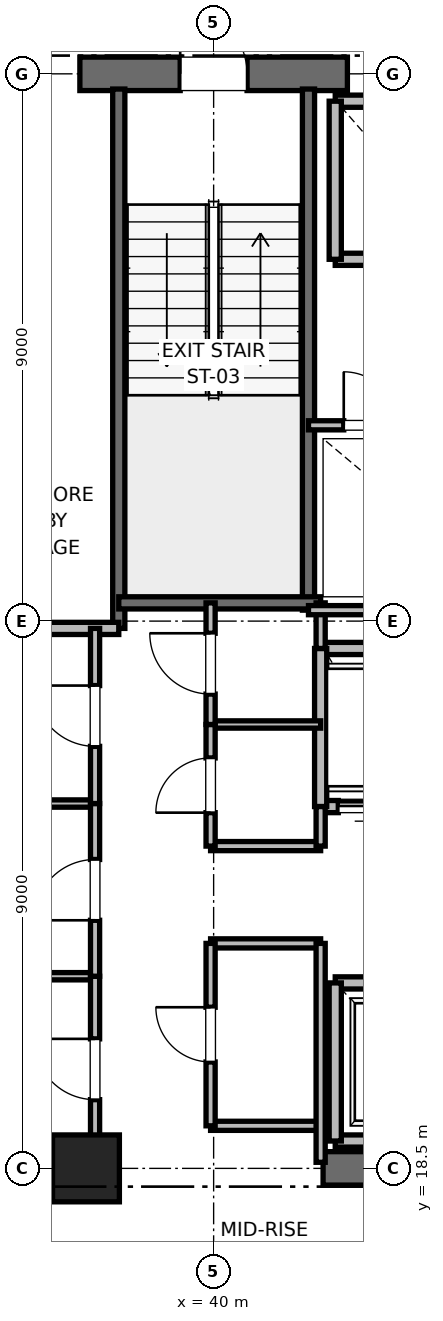
"""IFC4 building model, lengths in metres.
Left out: names, types, materials, properties, quantities, classifications, styles, units other than length and angle.
Written with IfcOpenShell. Run it as: python <this file> out.ifc"""

import sys

from ifc_helpers import new_model, si_unit, direction, frame, frame_2d, origin, origin_2d, place, context, subcontext, project, spatial, rectangle, extrude, element, fill, save


model = new_model("IFC4")
c1 = context("Model", 3, precision=1e-05, world=origin(), true_north=direction((0.0, 1.0)))
c2 = subcontext(c1, "Body", "Model", "MODEL_VIEW")
j1 = project(units=[si_unit("LENGTHUNIT", "METRE"), si_unit("PLANEANGLEUNIT", "RADIAN")], contexts=[c1])
p1 = place(None, origin())
s1 = spatial("IfcSite", under=j1, at=p1, CompositionType="ELEMENT")
p2 = place(p1, origin())
s2 = spatial("IfcBuilding", under=s1, at=p2, CompositionType="ELEMENT")
p3 = place(p2, frame((0.0, 0.0, 172.4)))
s3 = spatial("IfcBuildingStorey", under=s2, at=p3, CompositionType="ELEMENT", Elevation=172.4)
p4 = place(p3, frame((37.9, 18.5, 0.0), z_axis=(0.0, 0.0, 1.0), x_axis=(1.0, 0.0, 0.0)))
e1 = element("IfcColumn", 1, at=p4, inside=s3, PredefinedType="PILASTER", context=c2, shape_type="SweptSolid", body=[
    extrude(rectangle(XDim=1.1, YDim=1.1, at=origin_2d()), origin(), (0.0, 0.0, 1.0), 4.0),
])
for number, where, z_axis, x_axis in (
    (2, (29.0, 18.5, 0.0), (0.0, 0.0, 1.0), (1.0, 0.0, 0.0)),
    (3, (41.8, 18.5, 0.0), (0.0, 0.0, 1.0), (1.0, 0.0, 0.0)),
):
    element("IfcWall", number, at=place(p3, frame(where, z_axis=z_axis, x_axis=x_axis)), inside=s3, PredefinedType="SHEAR", context=c2, shape_type="SweptSolid", body=[
        extrude(rectangle(XDim=9.2, YDim=0.55, at=frame_2d((4.6, 0.0))), origin(), (0.0, 0.0, 1.0), 3.775),
    ])
p5 = place(p3, frame((37.8, 36.5, 0.0), z_axis=(0.0, 0.0, 1.0), x_axis=(1.0, 0.0, 0.0)))
e4 = element("IfcWall", 4, at=p5, inside=s3, PredefinedType="SHEAR", context=c2, shape_type="SweptSolid", body=[
    extrude(rectangle(XDim=4.4, YDim=0.55, at=frame_2d((2.2, 0.0))), origin(), (0.0, 0.0, 1.0), 3.775),
])
p6 = place(p5, frame((1.65, 0.0, 0.0)))
e5 = element("IfcOpeningElement", 5, at=p6, cuts=e4, PredefinedType="OPENING", context=c2, shape_type="SweptSolid", body=[
    extrude(rectangle(XDim=1.1, YDim=2.15, at=frame_2d((0.55, 1.075))), frame((0.0, 0.275, 0.0), z_axis=(0.0, -1.0, 0.0), x_axis=(1.0, 0.0, 0.0)), (0.0, 0.0, 1.0), 0.55),
])
p7 = place(p3, frame((38.44, 27.38, 0.0), z_axis=(0.0, 0.0, 1.0), x_axis=(0.0, 1.0, 0.0)))
e6 = element("IfcWall", 6, at=p7, inside=s3, PredefinedType="SOLIDWALL", context=c2, shape_type="SweptSolid", body=[
    extrude(rectangle(XDim=8.87, YDim=0.2, at=frame_2d((4.435, 0.0))), origin(), (0.0, 0.0, 1.0), 3.775),
])
p8 = place(p3, frame((41.56, 27.68, 0.0), z_axis=(0.0, 0.0, 1.0), x_axis=(0.0, 1.0, 0.0)))
e7 = element("IfcWall", 7, at=p8, inside=s3, PredefinedType="SOLIDWALL", context=c2, shape_type="SweptSolid", body=[
    extrude(rectangle(XDim=8.57, YDim=0.2, at=frame_2d((4.285, 0.0))), origin(), (0.0, 0.0, 1.0), 3.775),
])
p9 = place(p3, frame((38.44, 27.8, 0.0), z_axis=(0.0, 0.0, 1.0), x_axis=(1.0, 0.0, 0.0)))
e8 = element("IfcWall", 8, at=p9, inside=s3, PredefinedType="SOLIDWALL", context=c2, shape_type="SweptSolid", body=[
    extrude(rectangle(XDim=3.32, YDim=0.2, at=frame_2d((1.66, 0.0))), origin(), (0.0, 0.0, 1.0), 3.775),
])
p10 = place(p3, frame((32.82, 27.38, 0.0), z_axis=(0.0, 0.0, 1.0), x_axis=(1.0, 0.0, 0.0)))
e9 = element("IfcWall", 9, at=p10, inside=s3, PredefinedType="PARTITIONING", context=c2, shape_type="SweptSolid", body=[
    extrude(rectangle(XDim=5.62, YDim=0.2, at=frame_2d((2.81, 0.0))), origin(), (0.0, 0.0, 1.0), 3.775),
])
p11 = place(p3, frame((42.0, 18.95, 0.0), z_axis=(0.0, 0.0, 1.0), x_axis=(1.0, 0.0, 0.0)))
e10 = element("IfcWall", 10, at=p11, inside=s3, PredefinedType="SOLIDWALL", context=c2, shape_type="SweptSolid", body=[
    extrude(rectangle(XDim=2.3, YDim=0.2, at=frame_2d((1.15, 0.0))), origin(), (0.0, 0.0, 1.0), 2.755),
])
p12 = place(p3, frame((44.3, 21.55, 0.0), z_axis=(0.0, 0.0, 1.0), x_axis=(-1.0, 0.0, 0.0)))
e11 = element("IfcWall", 11, at=p12, inside=s3, PredefinedType="SOLIDWALL", context=c2, shape_type="SweptSolid", body=[
    extrude(rectangle(XDim=2.3, YDim=0.2, at=frame_2d((1.15, 0.0))), origin(), (0.0, 0.0, 1.0), 3.775),
])
p13 = place(p12, frame((0.6, 0.0, 0.0)))
e12 = element("IfcOpeningElement", 12, at=p13, cuts=e11, PredefinedType="OPENING", context=c2, shape_type="SweptSolid", body=[
    extrude(rectangle(XDim=1.1, YDim=2.2, at=frame_2d((0.55, 1.1))), frame((0.0, 0.1, 0.0), z_axis=(0.0, -1.0, 0.0), x_axis=(1.0, 0.0, 0.0)), (0.0, 0.0, 1.0), 0.2),
])
p14 = place(p3, frame((42.0, 21.55, 0.0), z_axis=(0.0, 0.0, 1.0), x_axis=(0.0, -1.0, 0.0)))
e13 = element("IfcWall", 13, at=p14, inside=s3, PredefinedType="SOLIDWALL", context=c2, shape_type="SweptSolid", body=[
    extrude(rectangle(XDim=2.6, YDim=0.2, at=frame_2d((1.3, 0.0))), origin(), (0.0, 0.0, 1.0), 2.755),
])
p15 = place(p3, frame((41.76, 24.45, 0.0), z_axis=(0.0, 0.0, 1.0), x_axis=(1.0, 0.0, 0.0)))
e14 = element("IfcWall", 14, at=p15, inside=s3, PredefinedType="SOLIDWALL", context=c2, shape_type="SweptSolid", body=[
    extrude(rectangle(XDim=1.68, YDim=0.2, at=frame_2d((0.84, 0.0))), origin(), (0.0, 0.0, 1.0), 3.775),
])
p16 = place(p15, frame((0.29, 0.0, 0.0)))
e15 = element("IfcOpeningElement", 15, at=p16, cuts=e14, PredefinedType="OPENING", context=c2, shape_type="SweptSolid", body=[
    extrude(rectangle(XDim=1.1, YDim=2.2, at=frame_2d((0.55, 1.1))), frame((0.0, 0.1, 0.0), z_axis=(0.0, -1.0, 0.0), x_axis=(1.0, 0.0, 0.0)), (0.0, 0.0, 1.0), 0.2),
])
p17 = place(p3, frame((43.44, 27.05, 0.0), z_axis=(0.0, 0.0, 1.0), x_axis=(-1.0, 0.0, 0.0)))
e16 = element("IfcWall", 16, at=p17, inside=s3, PredefinedType="SOLIDWALL", context=c2, shape_type="SweptSolid", body=[
    extrude(rectangle(XDim=1.68, YDim=0.2, at=frame_2d((0.84, 0.0))), origin(), (0.0, 0.0, 1.0), 3.775),
])
p18 = place(p3, frame((41.76, 27.05, 0.0), z_axis=(0.0, 0.0, 1.0), x_axis=(0.0, -1.0, 0.0)))
e17 = element("IfcWall", 17, at=p18, inside=s3, PredefinedType="SOLIDWALL", context=c2, shape_type="SweptSolid", body=[
    extrude(rectangle(XDim=2.6, YDim=0.2, at=frame_2d((1.3, 0.0))), origin(), (0.0, 0.0, 1.0), 3.775),
])
p19 = place(p3, frame((42.0, 33.45, 0.0), z_axis=(0.0, 0.0, 1.0), x_axis=(1.0, 0.0, 0.0)))
e18 = element("IfcWall", 18, at=p19, inside=s3, PredefinedType="SOLIDWALL", context=c2, shape_type="SweptSolid", body=[
    extrude(rectangle(XDim=2.3, YDim=0.2, at=frame_2d((1.15, 0.0))), origin(), (0.0, 0.0, 1.0), 3.775),
])
p20 = place(p3, frame((44.3, 36.05, 0.0), z_axis=(0.0, 0.0, 1.0), x_axis=(-1.0, 0.0, 0.0)))
e19 = element("IfcWall", 19, at=p20, inside=s3, PredefinedType="SOLIDWALL", context=c2, shape_type="SweptSolid", body=[
    extrude(rectangle(XDim=2.3, YDim=0.2, at=frame_2d((1.15, 0.0))), origin(), (0.0, 0.0, 1.0), 2.755),
])
p21 = place(p3, frame((42.0, 36.05, 0.0), z_axis=(0.0, 0.0, 1.0), x_axis=(0.0, -1.0, 0.0)))
e20 = element("IfcWall", 20, at=p21, inside=s3, PredefinedType="SOLIDWALL", context=c2, shape_type="SweptSolid", body=[
    extrude(rectangle(XDim=2.6, YDim=0.2, at=frame_2d((1.3, 0.0))), origin(), (0.0, 0.0, 1.0), 2.755),
])
for number, where, z_axis, x_axis in (
    (21, (39.95, 19.2, 0.0), (0.0, 0.0, 1.0), (1.0, 0.0, 0.0)),
    (22, (39.95, 22.2, 0.0), (0.0, 0.0, 1.0), (1.0, 0.0, 0.0)),
    (23, (39.95, 23.8, 0.0), (0.0, 0.0, 1.0), (1.0, 0.0, 0.0)),
):
    element("IfcWall", number, at=place(p3, frame(where, z_axis=z_axis, x_axis=x_axis)), inside=s3, PredefinedType="PARTITIONING", context=c2, shape_type="SweptSolid", body=[
        extrude(rectangle(XDim=1.81, YDim=0.15, at=frame_2d((0.905, 0.0))), origin(), (0.0, 0.0, 1.0), 2.85),
    ])
p22 = place(p3, frame((39.95, 25.8, 0.0), z_axis=(0.0, 0.0, 1.0), x_axis=(1.0, 0.0, 0.0)))
e24 = element("IfcWall", 24, at=p22, inside=s3, PredefinedType="PARTITIONING", context=c2, shape_type="SweptSolid", body=[
    extrude(rectangle(XDim=1.81, YDim=0.12, at=frame_2d((0.905, 0.0))), origin(), (0.0, 0.0, 1.0), 2.85),
])
p23 = place(p3, frame((41.76, 18.6, 0.0), z_axis=(0.0, 0.0, 1.0), x_axis=(0.0, 1.0, 0.0)))
e25 = element("IfcWall", 25, at=p23, inside=s3, PredefinedType="PARTITIONING", context=c2, shape_type="SweptSolid", body=[
    extrude(rectangle(XDim=3.6, YDim=0.15, at=frame_2d((1.8, 0.0))), origin(), (0.0, 0.0, 1.0), 2.755),
])
p24 = place(p3, frame((41.76, 23.8, 0.0), z_axis=(0.0, 0.0, 1.0), x_axis=(0.0, 1.0, 0.0)))
e26 = element("IfcWall", 26, at=p24, inside=s3, PredefinedType="PARTITIONING", context=c2, shape_type="SweptSolid", body=[
    extrude(rectangle(XDim=0.65, YDim=0.15, at=frame_2d((0.325, 0.0))), origin(), (0.0, 0.0, 1.0), 2.85),
])
p25 = place(p3, frame((41.76, 27.05, 0.0), z_axis=(0.0, 0.0, 1.0), x_axis=(0.0, 1.0, 0.0)))
e27 = element("IfcWall", 27, at=p25, inside=s3, PredefinedType="PARTITIONING", context=c2, shape_type="SweptSolid", body=[
    extrude(rectangle(XDim=0.75, YDim=0.15, at=frame_2d((0.375, 0.0))), origin(), (0.0, 0.0, 1.0), 2.85),
])
p26 = place(p3, frame((39.95, 19.2, 0.0), z_axis=(0.0, 0.0, 1.0), x_axis=(0.0, 1.0, 0.0)))
e28 = element("IfcWall", 28, at=p26, inside=s3, PredefinedType="PARTITIONING", context=c2, shape_type="SweptSolid", body=[
    extrude(rectangle(XDim=3.0, YDim=0.15, at=frame_2d((1.5, 0.0))), origin(), (0.0, 0.0, 1.0), 2.85),
])
p27 = place(p26, frame((1.05, 0.0, 0.0)))
e29 = element("IfcOpeningElement", 29, at=p27, cuts=e28, PredefinedType="OPENING", context=c2, shape_type="SweptSolid", body=[
    extrude(rectangle(XDim=0.9, YDim=2.1, at=frame_2d((0.45, 1.05))), frame((0.0, 0.075, 0.0), z_axis=(0.0, -1.0, 0.0), x_axis=(1.0, 0.0, 0.0)), (0.0, 0.0, 1.0), 0.15),
])
p28 = place(p3, frame((39.95, 23.8, 0.0), z_axis=(0.0, 0.0, 1.0), x_axis=(0.0, 1.0, 0.0)))
e30 = element("IfcWall", 30, at=p28, inside=s3, PredefinedType="PARTITIONING", context=c2, shape_type="SweptSolid", body=[
    extrude(rectangle(XDim=2.0, YDim=0.15, at=frame_2d((1.0, 0.0))), origin(), (0.0, 0.0, 1.0), 2.85),
])
p29 = place(p28, frame((0.55, 0.0, 0.0)))
e31 = element("IfcOpeningElement", 31, at=p29, cuts=e30, PredefinedType="OPENING", context=c2, shape_type="SweptSolid", body=[
    extrude(rectangle(XDim=0.9, YDim=2.1, at=frame_2d((0.45, 1.05))), frame((0.0, 0.075, 0.0), z_axis=(0.0, -1.0, 0.0), x_axis=(1.0, 0.0, 0.0)), (0.0, 0.0, 1.0), 0.15),
])
p30 = place(p3, frame((39.95, 25.8, 0.0), z_axis=(0.0, 0.0, 1.0), x_axis=(0.0, 1.0, 0.0)))
e32 = element("IfcWall", 32, at=p30, inside=s3, PredefinedType="PARTITIONING", context=c2, shape_type="SweptSolid", body=[
    extrude(rectangle(XDim=2.0, YDim=0.15, at=frame_2d((1.0, 0.0))), origin(), (0.0, 0.0, 1.0), 2.85),
])
p31 = place(p30, frame((0.5, 0.0, 0.0)))
e33 = element("IfcOpeningElement", 33, at=p31, cuts=e32, PredefinedType="OPENING", context=c2, shape_type="SweptSolid", body=[
    extrude(rectangle(XDim=1.0, YDim=2.15, at=frame_2d((0.5, 1.075))), frame((0.0, 0.075, 0.0), z_axis=(0.0, -1.0, 0.0), x_axis=(1.0, 0.0, 0.0)), (0.0, 0.0, 1.0), 0.15),
])
for number, where, z_axis, x_axis in (
    (34, (32.82, 21.66, 0.0), (0.0, 0.0, 1.0), (1.0, 0.0, 0.0)),
    (35, (32.82, 24.5, 0.0), (0.0, 0.0, 1.0), (1.0, 0.0, 0.0)),
):
    element("IfcWall", number, at=place(p3, frame(where, z_axis=z_axis, x_axis=x_axis)), inside=s3, PredefinedType="PARTITIONING", context=c2, shape_type="SweptSolid", body=[
        extrude(rectangle(XDim=5.23, YDim=0.12, at=frame_2d((2.615, 0.0))), origin(), (0.0, 0.0, 1.0), 2.85),
    ])
p32 = place(p3, frame((38.05, 18.6, 0.0), z_axis=(0.0, 0.0, 1.0), x_axis=(0.0, 1.0, 0.0)))
e36 = element("IfcWall", 36, at=p32, inside=s3, PredefinedType="PARTITIONING", context=c2, shape_type="SweptSolid", body=[
    extrude(rectangle(XDim=3.06, YDim=0.15, at=frame_2d((1.53, 0.0))), origin(), (0.0, 0.0, 1.0), 2.755),
])
p33 = place(p32, frame((1.03, 0.0, 0.0)))
e37 = element("IfcOpeningElement", 37, at=p33, cuts=e36, PredefinedType="OPENING", context=c2, shape_type="SweptSolid", body=[
    extrude(rectangle(XDim=1.0, YDim=2.15, at=frame_2d((0.5, 1.075))), frame((0.0, 0.075, 0.0), z_axis=(0.0, -1.0, 0.0), x_axis=(1.0, 0.0, 0.0)), (0.0, 0.0, 1.0), 0.15),
])
p34 = place(p3, frame((38.05, 21.66, 0.0), z_axis=(0.0, 0.0, 1.0), x_axis=(0.0, 1.0, 0.0)))
e38 = element("IfcWall", 38, at=p34, inside=s3, PredefinedType="PARTITIONING", context=c2, shape_type="SweptSolid", body=[
    extrude(rectangle(XDim=2.84, YDim=0.15, at=frame_2d((1.42, 0.0))), origin(), (0.0, 0.0, 1.0), 2.85),
])
p35 = place(p34, frame((0.92, 0.0, 0.0)))
e39 = element("IfcOpeningElement", 39, at=p35, cuts=e38, PredefinedType="OPENING", context=c2, shape_type="SweptSolid", body=[
    extrude(rectangle(XDim=1.0, YDim=2.15, at=frame_2d((0.5, 1.075))), frame((0.0, 0.075, 0.0), z_axis=(0.0, -1.0, 0.0), x_axis=(1.0, 0.0, 0.0)), (0.0, 0.0, 1.0), 0.15),
])
p36 = place(p3, frame((38.05, 24.5, 0.0), z_axis=(0.0, 0.0, 1.0), x_axis=(0.0, 1.0, 0.0)))
e40 = element("IfcWall", 40, at=p36, inside=s3, PredefinedType="PARTITIONING", context=c2, shape_type="SweptSolid", body=[
    extrude(rectangle(XDim=2.88, YDim=0.15, at=frame_2d((1.44, 0.0))), origin(), (0.0, 0.0, 1.0), 2.85),
])
p37 = place(p36, frame((0.94, 0.0, 0.0)))
e41 = element("IfcOpeningElement", 41, at=p37, cuts=e40, PredefinedType="OPENING", context=c2, shape_type="SweptSolid", body=[
    extrude(rectangle(XDim=1.0, YDim=2.15, at=frame_2d((0.5, 1.075))), frame((0.0, 0.075, 0.0), z_axis=(0.0, -1.0, 0.0), x_axis=(1.0, 0.0, 0.0)), (0.0, 0.0, 1.0), 0.15),
])
p38 = place(p3, frame((41.56, 27.68, 0.0), z_axis=(0.0, 0.0, 1.0), x_axis=(1.0, 0.0, 0.0)))
e42 = element("IfcWall", 42, at=p38, inside=s3, PredefinedType="PARTITIONING", context=c2, shape_type="SweptSolid", body=[
    extrude(rectangle(XDim=3.59, YDim=0.15, at=frame_2d((1.795, 0.0))), origin(), (0.0, 0.0, 1.0), 2.85),
])
p39 = place(p3, frame((41.56, 30.72, 0.0), z_axis=(0.0, 0.0, 1.0), x_axis=(1.0, 0.0, 0.0)))
e43 = element("IfcWall", 43, at=p39, inside=s3, PredefinedType="PARTITIONING", context=c2, shape_type="SweptSolid", body=[
    extrude(rectangle(XDim=2.04, YDim=0.15, at=frame_2d((1.02, 0.0))), origin(), (0.0, 0.0, 1.0), 2.85),
])
p40 = place(p39, frame((0.58, 0.0, 0.0)))
e44 = element("IfcOpeningElement", 44, at=p40, cuts=e43, PredefinedType="OPENING", context=c2, shape_type="SweptSolid", body=[
    extrude(rectangle(XDim=0.88, YDim=2.1, at=frame_2d((0.44, 1.05))), frame((0.0, 0.075, 0.0), z_axis=(0.0, -1.0, 0.0), x_axis=(1.0, 0.0, 0.0)), (0.0, 0.0, 1.0), 0.15),
])
p41 = place(p6, origin())
e45 = element("IfcDoor", 45, at=p41, inside=s3, OperationType="SINGLE_SWING_LEFT", PredefinedType="DOOR", context=c2, shape_type="SweptSolid", body=[
    extrude(rectangle(XDim=1.1, YDim=2.15, at=frame_2d((0.55, 1.075))), frame((0.0, 0.025, 0.0), z_axis=(0.0, -1.0, 0.0), x_axis=(1.0, 0.0, 0.0)), (0.0, 0.0, 1.0), 0.05),
])
fill(e5, e45)
p42 = place(p16, origin())
e46 = element("IfcDoor", 46, at=p42, inside=s3, OperationType="SLIDING_TO_RIGHT", PredefinedType="DOOR", context=c2, shape_type="SweptSolid", body=[
    extrude(rectangle(XDim=1.1, YDim=2.2, at=frame_2d((0.55, 1.1))), frame((0.0, 0.025, 0.0), z_axis=(0.0, -1.0, 0.0), x_axis=(1.0, 0.0, 0.0)), (0.0, 0.0, 1.0), 0.05),
])
fill(e15, e46)
p43 = place(p27, origin())
e47 = element("IfcDoor", 47, at=p43, inside=s3, OperationType="SINGLE_SWING_RIGHT", PredefinedType="DOOR", context=c2, shape_type="SweptSolid", body=[
    extrude(rectangle(XDim=0.9, YDim=2.1, at=frame_2d((0.45, 1.05))), frame((0.0, 0.025, 0.0), z_axis=(0.0, -1.0, 0.0), x_axis=(1.0, 0.0, 0.0)), (0.0, 0.0, 1.0), 0.05),
])
fill(e29, e47)
p44 = place(p29, origin())
e48 = element("IfcDoor", 48, at=p44, inside=s3, OperationType="SINGLE_SWING_LEFT", PredefinedType="DOOR", context=c2, shape_type="SweptSolid", body=[
    extrude(rectangle(XDim=0.9, YDim=2.1, at=frame_2d((0.45, 1.05))), frame((0.0, 0.025, 0.0), z_axis=(0.0, -1.0, 0.0), x_axis=(1.0, 0.0, 0.0)), (0.0, 0.0, 1.0), 0.05),
])
fill(e31, e48)
p45 = place(p31, origin())
e49 = element("IfcDoor", 49, at=p45, inside=s3, OperationType="SINGLE_SWING_RIGHT", PredefinedType="DOOR", context=c2, shape_type="SweptSolid", body=[
    extrude(rectangle(XDim=1.0, YDim=2.15, at=frame_2d((0.5, 1.075))), frame((0.0, 0.025, 0.0), z_axis=(0.0, -1.0, 0.0), x_axis=(1.0, 0.0, 0.0)), (0.0, 0.0, 1.0), 0.05),
])
fill(e33, e49)
p46 = place(p33, origin())
e50 = element("IfcDoor", 50, at=p46, inside=s3, OperationType="SINGLE_SWING_RIGHT", PredefinedType="DOOR", context=c2, shape_type="SweptSolid", body=[
    extrude(rectangle(XDim=1.0, YDim=2.15, at=frame_2d((0.5, 1.075))), frame((0.0, 0.025, 0.0), z_axis=(0.0, -1.0, 0.0), x_axis=(1.0, 0.0, 0.0)), (0.0, 0.0, 1.0), 0.05),
])
fill(e37, e50)
p47 = place(p35, origin())
e51 = element("IfcDoor", 51, at=p47, inside=s3, OperationType="SINGLE_SWING_LEFT", PredefinedType="DOOR", context=c2, shape_type="SweptSolid", body=[
    extrude(rectangle(XDim=1.0, YDim=2.15, at=frame_2d((0.5, 1.075))), frame((0.0, 0.025, 0.0), z_axis=(0.0, -1.0, 0.0), x_axis=(1.0, 0.0, 0.0)), (0.0, 0.0, 1.0), 0.05),
])
fill(e39, e51)
p48 = place(p37, origin())
e52 = element("IfcDoor", 52, at=p48, inside=s3, OperationType="SINGLE_SWING_RIGHT", PredefinedType="DOOR", context=c2, shape_type="SweptSolid", body=[
    extrude(rectangle(XDim=1.0, YDim=2.15, at=frame_2d((0.5, 1.075))), frame((0.0, 0.025, 0.0), z_axis=(0.0, -1.0, 0.0), x_axis=(1.0, 0.0, 0.0)), (0.0, 0.0, 1.0), 0.05),
])
fill(e41, e52)
p49 = place(p40, origin())
e53 = element("IfcDoor", 53, at=p49, inside=s3, OperationType="SINGLE_SWING_LEFT", PredefinedType="DOOR", context=c2, shape_type="SweptSolid", body=[
    extrude(rectangle(XDim=0.88, YDim=2.1, at=frame_2d((0.44, 1.05))), frame((0.0, 0.025, 0.0), z_axis=(0.0, -1.0, 0.0), x_axis=(1.0, 0.0, 0.0)), (0.0, 0.0, 1.0), 0.05),
])
fill(e44, e53)
save(model, sys.argv[1])
